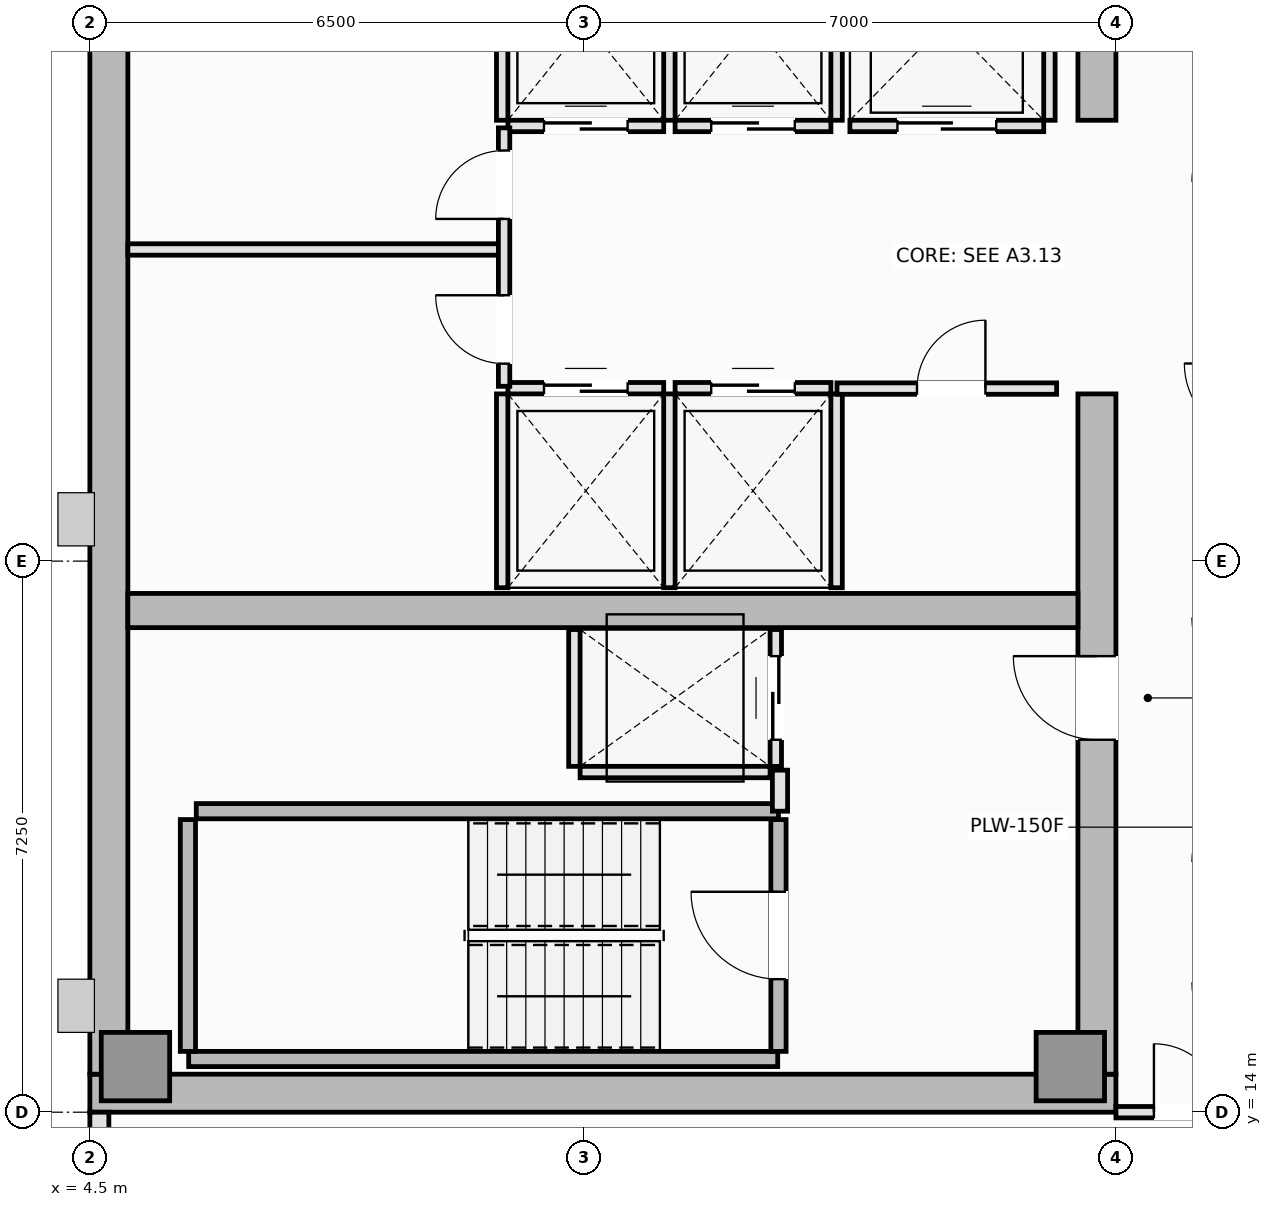
"""IFC4 building model, lengths in metres.
Left out: names, types, materials, properties, quantities, classifications, styles, units other than length and angle.
Written with IfcOpenShell. Run it as: python <this file> out.ifc"""

import sys

from ifc_helpers import new_model, si_unit, direction, frame, frame_2d, origin, origin_2d, place, context, subcontext, project, spatial, rectangle, extrude, element, fill, save


model = new_model("IFC4")
c1 = context("Model", 3, precision=1e-05, world=origin(), true_north=direction((0.0, 1.0)))
c2 = subcontext(c1, "Body", "Model", "MODEL_VIEW")
j1 = project(units=[si_unit("LENGTHUNIT", "METRE"), si_unit("PLANEANGLEUNIT", "RADIAN")], contexts=[c1])
p1 = place(None, origin())
s1 = spatial("IfcSite", under=j1, at=p1, CompositionType="ELEMENT")
p2 = place(p1, origin())
s2 = spatial("IfcBuilding", under=s1, at=p2, CompositionType="ELEMENT")
p3 = place(p2, frame((0.0, 0.0, 284.75)))
s3 = spatial("IfcBuildingStorey", under=s2, at=p3, CompositionType="ELEMENT", Elevation=284.75)
p4 = place(p3, frame((4.5, 14.25, 0.0), z_axis=(0.0, 0.0, 1.0), x_axis=(1.0, 0.0, 0.0)))
e1 = element("IfcWall", 1, at=p4, inside=s3, PredefinedType="SHEAR", context=c2, shape_type="SweptSolid", body=[
    extrude(rectangle(XDim=13.5, YDim=0.5, at=frame_2d((6.75, 0.0))), origin(), (0.0, 0.0, 1.0), 3.55),
])
p5 = place(p3, frame((4.75, 14.5, 0.0), z_axis=(0.0, 0.0, 1.0), x_axis=(0.0, 1.0, 0.0)))
e2 = element("IfcWall", 2, at=p5, inside=s3, PredefinedType="SHEAR", context=c2, shape_type="SweptSolid", body=[
    extrude(rectangle(XDim=21.5, YDim=0.5, at=frame_2d((10.75, 0.0))), origin(), (0.0, 0.0, 1.0), 3.55),
])
p6 = place(p3, frame((17.75, 14.5, 0.0), z_axis=(0.0, 0.0, 1.0), x_axis=(0.0, 1.0, 0.0)))
e3 = element("IfcWall", 3, at=p6, inside=s3, PredefinedType="SHEAR", context=c2, shape_type="SweptSolid", body=[
    extrude(rectangle(XDim=8.95, YDim=0.5, at=frame_2d((4.475, 0.0))), origin(), (0.0, 0.0, 1.0), 3.55),
])
p7 = place(p6, frame((4.4, 0.0, 0.0)))
e4 = element("IfcOpeningElement", 4, at=p7, cuts=e3, PredefinedType="OPENING", context=c2, shape_type="SweptSolid", body=[
    extrude(rectangle(XDim=1.1, YDim=2.15, at=frame_2d((0.55, 1.075))), frame((0.0, 0.26, 0.0), z_axis=(0.0, -1.0, 0.0), x_axis=(1.0, 0.0, 0.0)), (0.0, 0.0, 1.0), 0.52),
])
p8 = place(p3, frame((17.75, 27.05, 0.0), z_axis=(0.0, 0.0, 1.0), x_axis=(0.0, 1.0, 0.0)))
e5 = element("IfcWall", 5, at=p8, inside=s3, PredefinedType="SHEAR", context=c2, shape_type="SweptSolid", body=[
    extrude(rectangle(XDim=8.95, YDim=0.5, at=frame_2d((4.475, 0.0))), origin(), (0.0, 0.0, 1.0), 3.55),
])
p9 = place(p8, frame((3.45, 0.0, 0.0)))
e6 = element("IfcOpeningElement", 6, at=p9, cuts=e5, PredefinedType="OPENING", context=c2, shape_type="SweptSolid", body=[
    extrude(rectangle(XDim=1.1, YDim=2.15, at=frame_2d((0.55, 1.075))), frame((0.0, 0.26, 0.0), z_axis=(0.0, -1.0, 0.0), x_axis=(1.0, 0.0, 0.0)), (0.0, 0.0, 1.0), 0.52),
])
p10 = place(p3, frame((5.0, 20.6, 0.0), z_axis=(0.0, 0.0, 1.0), x_axis=(1.0, 0.0, 0.0)))
e7 = element("IfcWall", 7, at=p10, inside=s3, PredefinedType="SHEAR", context=c2, shape_type="SweptSolid", body=[
    extrude(rectangle(XDim=12.5, YDim=0.45, at=frame_2d((6.25, 0.0))), origin(), (0.0, 0.0, 1.0), 3.55),
])
for number, where, z_axis, x_axis in (
    (8, (5.1, 14.6, 0.0), (0.0, 0.0, 1.0), (1.0, 0.0, 0.0)),
    (9, (17.4, 14.6, 0.0), (0.0, 0.0, 1.0), (1.0, 0.0, 0.0)),
):
    element("IfcColumn", number, at=place(p3, frame(where, z_axis=z_axis, x_axis=x_axis)), inside=s3, PredefinedType="PILASTER", context=c2, shape_type="SweptSolid", body=[
        extrude(rectangle(XDim=0.9, YDim=0.9, at=origin_2d()), origin(), (0.0, 0.0, 1.0), 3.55),
    ])
p11 = place(p3, frame((4.625, 14.0, 0.0), z_axis=(0.0, 0.0, 1.0), x_axis=(0.0, -1.0, 0.0)))
e10 = element("IfcWall", 10, at=p11, inside=s3, PredefinedType="SOLIDWALL", context=c2, shape_type="SweptSolid", body=[
    extrude(rectangle(XDim=3.4, YDim=0.25, at=frame_2d((1.7, 0.0))), origin(), (0.0, 0.0, 1.0), 3.39),
])
p12 = place(p11, frame((0.6, 0.0, 0.9)))
e11 = element("IfcOpeningElement", 11, at=p12, cuts=e10, PredefinedType="OPENING", context=c2, shape_type="SweptSolid", body=[
    extrude(rectangle(XDim=2.2, YDim=1.8, at=frame_2d((1.1, 0.9))), frame((0.0, 0.135, 0.0), z_axis=(0.0, -1.0, 0.0), x_axis=(1.0, 0.0, 0.0)), (0.0, 0.0, 1.0), 0.27),
])
p13 = place(p3, frame((5.8, 14.7, 0.0), z_axis=(0.0, 0.0, 1.0), x_axis=(1.0, 0.0, 0.0)))
e12 = element("IfcWall", 12, at=p13, inside=s3, PredefinedType="SOLIDWALL", context=c2, shape_type="SweptSolid", body=[
    extrude(rectangle(XDim=7.75, YDim=0.2, at=frame_2d((3.875, 0.0))), origin(), (0.0, 0.0, 1.0), 3.55),
])
p14 = place(p3, frame((5.79, 14.8, 0.0), z_axis=(0.0, 0.0, 1.0), x_axis=(0.0, 1.0, 0.0)))
e13 = element("IfcWall", 13, at=p14, inside=s3, PredefinedType="SOLIDWALL", context=c2, shape_type="SweptSolid", body=[
    extrude(rectangle(XDim=3.05, YDim=0.2, at=frame_2d((1.525, 0.0))), origin(), (0.0, 0.0, 1.0), 3.55),
])
p15 = place(p3, frame((5.9, 17.96, 0.0), z_axis=(0.0, 0.0, 1.0), x_axis=(1.0, 0.0, 0.0)))
e14 = element("IfcWall", 14, at=p15, inside=s3, PredefinedType="SOLIDWALL", context=c2, shape_type="SweptSolid", body=[
    extrude(rectangle(XDim=7.66, YDim=0.2, at=frame_2d((3.83, 0.0))), origin(), (0.0, 0.0, 1.0), 3.55),
])
p16 = place(p3, frame((13.56, 14.8, 0.0), z_axis=(0.0, 0.0, 1.0), x_axis=(0.0, 1.0, 0.0)))
e15 = element("IfcWall", 15, at=p16, inside=s3, PredefinedType="SOLIDWALL", context=c2, shape_type="SweptSolid", body=[
    extrude(rectangle(XDim=3.05, YDim=0.2, at=frame_2d((1.525, 0.0))), origin(), (0.0, 0.0, 1.0), 3.55),
])
p17 = place(p16, frame((0.95, 0.0, 0.0)))
e16 = element("IfcOpeningElement", 16, at=p17, cuts=e15, PredefinedType="OPENING", context=c2, shape_type="SweptSolid", body=[
    extrude(rectangle(XDim=1.15, YDim=2.15, at=frame_2d((0.575, 1.075))), frame((0.0, 0.11, 0.0), z_axis=(0.0, -1.0, 0.0), x_axis=(1.0, 0.0, 0.0)), (0.0, 0.0, 1.0), 0.22),
])
p18 = place(p3, frame((10.0, 23.525, 0.0), z_axis=(0.0, 0.0, 1.0), x_axis=(1.0, 0.0, 0.0)))
e17 = element("IfcWall", 17, at=p18, inside=s3, PredefinedType="PARTITIONING", context=c2, shape_type="SweptSolid", body=[
    extrude(rectangle(XDim=2.05, YDim=0.15, at=frame_2d((1.025, 0.0))), origin(), (0.0, 0.0, 1.0), 3.39),
])
p19 = place(p18, frame((0.475, 0.0, 0.0)))
e18 = element("IfcOpeningElement", 18, at=p19, cuts=e17, PredefinedType="OPENING", context=c2, shape_type="SweptSolid", body=[
    extrude(rectangle(XDim=1.1, YDim=2.2, at=frame_2d((0.55, 1.1))), frame((0.0, 0.085, 0.0), z_axis=(0.0, -1.0, 0.0), x_axis=(1.0, 0.0, 0.0)), (0.0, 0.0, 1.0), 0.17),
])
for number, where, z_axis, x_axis in (
    (19, (9.925, 20.9, 0.0), (0.0, 0.0, 1.0), (0.0, 1.0, 0.0)),
    (20, (12.125, 20.9, 0.0), (0.0, 0.0, 1.0), (0.0, 1.0, 0.0)),
):
    element("IfcWall", number, at=place(p3, frame(where, z_axis=z_axis, x_axis=x_axis)), inside=s3, PredefinedType="PARTITIONING", context=c2, shape_type="SweptSolid", body=[
        extrude(rectangle(XDim=2.55, YDim=0.15, at=frame_2d((1.275, 0.0))), origin(), (0.0, 0.0, 1.0), 3.39),
    ])
p20 = place(p3, frame((12.2, 23.525, 0.0), z_axis=(0.0, 0.0, 1.0), x_axis=(1.0, 0.0, 0.0)))
e21 = element("IfcWall", 21, at=p20, inside=s3, PredefinedType="PARTITIONING", context=c2, shape_type="SweptSolid", body=[
    extrude(rectangle(XDim=2.05, YDim=0.15, at=frame_2d((1.025, 0.0))), origin(), (0.0, 0.0, 1.0), 3.39),
])
p21 = place(p20, frame((0.475, 0.0, 0.0)))
e22 = element("IfcOpeningElement", 22, at=p21, cuts=e21, PredefinedType="OPENING", context=c2, shape_type="SweptSolid", body=[
    extrude(rectangle(XDim=1.1, YDim=2.2, at=frame_2d((0.55, 1.1))), frame((0.0, 0.085, 0.0), z_axis=(0.0, -1.0, 0.0), x_axis=(1.0, 0.0, 0.0)), (0.0, 0.0, 1.0), 0.17),
])
p22 = place(p3, frame((14.325, 20.9, 0.0), z_axis=(0.0, 0.0, 1.0), x_axis=(0.0, 1.0, 0.0)))
e23 = element("IfcWall", 23, at=p22, inside=s3, PredefinedType="PARTITIONING", context=c2, shape_type="SweptSolid", body=[
    extrude(rectangle(XDim=2.55, YDim=0.15, at=frame_2d((1.275, 0.0))), origin(), (0.0, 0.0, 1.0), 3.39),
])
p23 = place(p3, frame((10.0, 26.975, 0.0), z_axis=(0.0, 0.0, 1.0), x_axis=(1.0, 0.0, 0.0)))
e24 = element("IfcWall", 24, at=p23, inside=s3, PredefinedType="PARTITIONING", context=c2, shape_type="SweptSolid", body=[
    extrude(rectangle(XDim=2.05, YDim=0.15, at=frame_2d((1.025, 0.0))), origin(), (0.0, 0.0, 1.0), 3.39),
])
p24 = place(p23, frame((0.475, 0.0, 0.0)))
e25 = element("IfcOpeningElement", 25, at=p24, cuts=e24, PredefinedType="OPENING", context=c2, shape_type="SweptSolid", body=[
    extrude(rectangle(XDim=1.1, YDim=2.2, at=frame_2d((0.55, 1.1))), frame((0.0, 0.085, 0.0), z_axis=(0.0, -1.0, 0.0), x_axis=(1.0, 0.0, 0.0)), (0.0, 0.0, 1.0), 0.17),
])
for number, where, z_axis, x_axis in (
    (26, (9.925, 27.05, 0.0), (0.0, 0.0, 1.0), (0.0, 1.0, 0.0)),
    (27, (12.125, 27.05, 0.0), (0.0, 0.0, 1.0), (0.0, 1.0, 0.0)),
):
    element("IfcWall", number, at=place(p3, frame(where, z_axis=z_axis, x_axis=x_axis)), inside=s3, PredefinedType="PARTITIONING", context=c2, shape_type="SweptSolid", body=[
        extrude(rectangle(XDim=2.55, YDim=0.15, at=frame_2d((1.275, 0.0))), origin(), (0.0, 0.0, 1.0), 3.39),
    ])
p25 = place(p3, frame((12.2, 26.975, 0.0), z_axis=(0.0, 0.0, 1.0), x_axis=(1.0, 0.0, 0.0)))
e28 = element("IfcWall", 28, at=p25, inside=s3, PredefinedType="PARTITIONING", context=c2, shape_type="SweptSolid", body=[
    extrude(rectangle(XDim=2.05, YDim=0.15, at=frame_2d((1.025, 0.0))), origin(), (0.0, 0.0, 1.0), 3.39),
])
p26 = place(p25, frame((0.475, 0.0, 0.0)))
e29 = element("IfcOpeningElement", 29, at=p26, cuts=e28, PredefinedType="OPENING", context=c2, shape_type="SweptSolid", body=[
    extrude(rectangle(XDim=1.1, YDim=2.2, at=frame_2d((0.55, 1.1))), frame((0.0, 0.085, 0.0), z_axis=(0.0, -1.0, 0.0), x_axis=(1.0, 0.0, 0.0)), (0.0, 0.0, 1.0), 0.17),
])
p27 = place(p3, frame((14.325, 27.05, 0.0), z_axis=(0.0, 0.0, 1.0), x_axis=(0.0, 1.0, 0.0)))
e30 = element("IfcWall", 30, at=p27, inside=s3, PredefinedType="PARTITIONING", context=c2, shape_type="SweptSolid", body=[
    extrude(rectangle(XDim=2.55, YDim=0.15, at=frame_2d((1.275, 0.0))), origin(), (0.0, 0.0, 1.0), 3.39),
])
p28 = place(p3, frame((14.5, 26.975, 0.0), z_axis=(0.0, 0.0, 1.0), x_axis=(1.0, 0.0, 0.0)))
e31 = element("IfcWall", 31, at=p28, inside=s3, PredefinedType="PARTITIONING", context=c2, shape_type="SweptSolid", body=[
    extrude(rectangle(XDim=2.55, YDim=0.15, at=frame_2d((1.275, 0.0))), origin(), (0.0, 0.0, 1.0), 3.39),
])
p29 = place(p28, frame((0.625, 0.0, 0.0)))
e32 = element("IfcOpeningElement", 32, at=p29, cuts=e31, PredefinedType="OPENING", context=c2, shape_type="SweptSolid", body=[
    extrude(rectangle(XDim=1.3, YDim=2.2, at=frame_2d((0.65, 1.1))), frame((0.0, 0.085, 0.0), z_axis=(0.0, -1.0, 0.0), x_axis=(1.0, 0.0, 0.0)), (0.0, 0.0, 1.0), 0.17),
])
p30 = place(p3, frame((17.125, 27.05, 0.0), z_axis=(0.0, 0.0, 1.0), x_axis=(0.0, 1.0, 0.0)))
e33 = element("IfcWall", 33, at=p30, inside=s3, PredefinedType="PARTITIONING", context=c2, shape_type="SweptSolid", body=[
    extrude(rectangle(XDim=2.6, YDim=0.15, at=frame_2d((1.3, 0.0))), origin(), (0.0, 0.0, 1.0), 3.39),
])
p31 = place(p3, frame((10.95, 18.475, 0.0), z_axis=(0.0, 0.0, 1.0), x_axis=(1.0, 0.0, 0.0)))
e34 = element("IfcWall", 34, at=p31, inside=s3, PredefinedType="PARTITIONING", context=c2, shape_type="SweptSolid", body=[
    extrude(rectangle(XDim=2.5, YDim=0.15, at=frame_2d((1.25, 0.0))), origin(), (0.0, 0.0, 1.0), 3.39),
])
p32 = place(p3, frame((10.875, 18.55, 0.0), z_axis=(0.0, 0.0, 1.0), x_axis=(0.0, 1.0, 0.0)))
e35 = element("IfcWall", 35, at=p32, inside=s3, PredefinedType="PARTITIONING", context=c2, shape_type="SweptSolid", body=[
    extrude(rectangle(XDim=1.8, YDim=0.15, at=frame_2d((0.9, 0.0))), origin(), (0.0, 0.0, 1.0), 3.39),
])
p33 = place(p3, frame((13.525, 18.55, 0.0), z_axis=(0.0, 0.0, 1.0), x_axis=(0.0, 1.0, 0.0)))
e36 = element("IfcWall", 36, at=p33, inside=s3, PredefinedType="PARTITIONING", context=c2, shape_type="SweptSolid", body=[
    extrude(rectangle(XDim=1.8, YDim=0.15, at=frame_2d((0.9, 0.0))), origin(), (0.0, 0.0, 1.0), 3.39),
])
p34 = place(p33, frame((0.35, 0.0, 0.0)))
e37 = element("IfcOpeningElement", 37, at=p34, cuts=e36, PredefinedType="OPENING", context=c2, shape_type="SweptSolid", body=[
    extrude(rectangle(XDim=1.1, YDim=2.2, at=frame_2d((0.55, 1.1))), frame((0.0, 0.085, 0.0), z_axis=(0.0, -1.0, 0.0), x_axis=(1.0, 0.0, 0.0)), (0.0, 0.0, 1.0), 0.17),
])
p35 = place(p3, frame((13.58, 17.96, 0.0), z_axis=(0.0, 0.0, 1.0), x_axis=(0.0, 1.0, 0.0)))
e38 = element("IfcWall", 38, at=p35, inside=s3, PredefinedType="PARTITIONING", context=c2, shape_type="SweptSolid", body=[
    extrude(rectangle(XDim=0.54, YDim=0.2, at=frame_2d((0.27, 0.0))), origin(), (0.0, 0.0, 1.0), 3.39),
])
p36 = place(p3, frame((5.0, 25.35, 0.0), z_axis=(0.0, 0.0, 1.0), x_axis=(1.0, 0.0, 0.0)))
e39 = element("IfcWall", 39, at=p36, inside=s3, PredefinedType="PARTITIONING", context=c2, shape_type="SweptSolid", body=[
    extrude(rectangle(XDim=4.95, YDim=0.15, at=frame_2d((2.475, 0.0))), origin(), (0.0, 0.0, 1.0), 3.39),
])
p37 = place(p3, frame((9.95, 23.55, 0.0), z_axis=(0.0, 0.0, 1.0), x_axis=(0.0, 1.0, 0.0)))
e40 = element("IfcWall", 40, at=p37, inside=s3, PredefinedType="PARTITIONING", context=c2, shape_type="SweptSolid", body=[
    extrude(rectangle(XDim=3.4, YDim=0.15, at=frame_2d((1.7, 0.0))), origin(), (0.0, 0.0, 1.0), 3.39),
])
p38 = place(p37, frame((0.298, 0.0, 0.0)))
e41 = element("IfcOpeningElement", 41, at=p38, cuts=e40, PredefinedType="OPENING", context=c2, shape_type="SweptSolid", body=[
    extrude(rectangle(XDim=0.9, YDim=2.1, at=frame_2d((0.45, 1.05))), frame((0.0, 0.085, 0.0), z_axis=(0.0, -1.0, 0.0), x_axis=(1.0, 0.0, 0.0)), (0.0, 0.0, 1.0), 0.17),
])
p39 = place(p37, frame((2.202, 0.0, 0.0)))
e42 = element("IfcOpeningElement", 42, at=p39, cuts=e40, PredefinedType="OPENING", context=c2, shape_type="SweptSolid", body=[
    extrude(rectangle(XDim=0.9, YDim=2.1, at=frame_2d((0.45, 1.05))), frame((0.0, 0.085, 0.0), z_axis=(0.0, -1.0, 0.0), x_axis=(1.0, 0.0, 0.0)), (0.0, 0.0, 1.0), 0.17),
])
p40 = place(p3, frame((14.33, 23.52, 0.0), z_axis=(0.0, 0.0, 1.0), x_axis=(1.0, 0.0, 0.0)))
e43 = element("IfcWall", 43, at=p40, inside=s3, PredefinedType="PARTITIONING", context=c2, shape_type="SweptSolid", body=[
    extrude(rectangle(XDim=2.89, YDim=0.15, at=frame_2d((1.445, 0.0))), origin(), (0.0, 0.0, 1.0), 3.39),
])
p41 = place(p40, frame((1.053, 0.0, 0.0)))
e44 = element("IfcOpeningElement", 44, at=p41, cuts=e43, PredefinedType="OPENING", context=c2, shape_type="SweptSolid", body=[
    extrude(rectangle(XDim=0.9, YDim=2.1, at=frame_2d((0.45, 1.05))), frame((0.0, 0.085, 0.0), z_axis=(0.0, -1.0, 0.0), x_axis=(1.0, 0.0, 0.0)), (0.0, 0.0, 1.0), 0.17),
])
p42 = place(p3, frame((18.0, 14.0, 0.0), z_axis=(0.0, 0.0, 1.0), x_axis=(1.0, 0.0, 0.0)))
e45 = element("IfcWall", 45, at=p42, inside=s3, PredefinedType="PARTITIONING", context=c2, shape_type="SweptSolid", body=[
    extrude(rectangle(XDim=1.9, YDim=0.15, at=frame_2d((0.95, 0.0))), origin(), (0.0, 0.0, 1.0), 3.39),
])
p43 = place(p42, frame((0.5, 0.0, 0.0)))
e46 = element("IfcOpeningElement", 46, at=p43, cuts=e45, PredefinedType="OPENING", context=c2, shape_type="SweptSolid", body=[
    extrude(rectangle(XDim=0.9, YDim=2.1, at=frame_2d((0.45, 1.05))), frame((0.0, 0.085, 0.0), z_axis=(0.0, -1.0, 0.0), x_axis=(1.0, 0.0, 0.0)), (0.0, 0.0, 1.0), 0.17),
])
p44 = place(p17, origin())
e47 = element("IfcDoor", 47, at=p44, inside=s3, OperationType="SINGLE_SWING_RIGHT", PredefinedType="DOOR", context=c2, shape_type="SweptSolid", body=[
    extrude(rectangle(XDim=1.15, YDim=2.15, at=frame_2d((0.575, 1.075))), frame((0.0, 0.025, 0.0), z_axis=(0.0, -1.0, 0.0), x_axis=(1.0, 0.0, 0.0)), (0.0, 0.0, 1.0), 0.05),
])
fill(e16, e47)
p45 = place(p19, origin())
e48 = element("IfcDoor", 48, at=p45, inside=s3, OperationType="DOUBLE_DOOR_SLIDING", PredefinedType="DOOR", context=c2, shape_type="SweptSolid", body=[
    extrude(rectangle(XDim=1.1, YDim=2.2, at=frame_2d((0.55, 1.1))), frame((0.0, 0.025, 0.0), z_axis=(0.0, -1.0, 0.0), x_axis=(1.0, 0.0, 0.0)), (0.0, 0.0, 1.0), 0.05),
])
fill(e18, e48)
p46 = place(p21, origin())
e49 = element("IfcDoor", 49, at=p46, inside=s3, OperationType="DOUBLE_DOOR_SLIDING", PredefinedType="DOOR", context=c2, shape_type="SweptSolid", body=[
    extrude(rectangle(XDim=1.1, YDim=2.2, at=frame_2d((0.55, 1.1))), frame((0.0, 0.025, 0.0), z_axis=(0.0, -1.0, 0.0), x_axis=(1.0, 0.0, 0.0)), (0.0, 0.0, 1.0), 0.05),
])
fill(e22, e49)
p47 = place(p24, origin())
e50 = element("IfcDoor", 50, at=p47, inside=s3, OperationType="DOUBLE_DOOR_SLIDING", PredefinedType="DOOR", context=c2, shape_type="SweptSolid", body=[
    extrude(rectangle(XDim=1.1, YDim=2.2, at=frame_2d((0.55, 1.1))), frame((0.0, 0.025, 0.0), z_axis=(0.0, -1.0, 0.0), x_axis=(1.0, 0.0, 0.0)), (0.0, 0.0, 1.0), 0.05),
])
fill(e25, e50)
p48 = place(p26, origin())
e51 = element("IfcDoor", 51, at=p48, inside=s3, OperationType="DOUBLE_DOOR_SLIDING", PredefinedType="DOOR", context=c2, shape_type="SweptSolid", body=[
    extrude(rectangle(XDim=1.1, YDim=2.2, at=frame_2d((0.55, 1.1))), frame((0.0, 0.025, 0.0), z_axis=(0.0, -1.0, 0.0), x_axis=(1.0, 0.0, 0.0)), (0.0, 0.0, 1.0), 0.05),
])
fill(e29, e51)
p49 = place(p29, origin())
e52 = element("IfcDoor", 52, at=p49, inside=s3, OperationType="DOUBLE_DOOR_SLIDING", PredefinedType="DOOR", context=c2, shape_type="SweptSolid", body=[
    extrude(rectangle(XDim=1.3, YDim=2.2, at=frame_2d((0.65, 1.1))), frame((0.0, 0.025, 0.0), z_axis=(0.0, -1.0, 0.0), x_axis=(1.0, 0.0, 0.0)), (0.0, 0.0, 1.0), 0.05),
])
fill(e32, e52)
p50 = place(p34, origin())
e53 = element("IfcDoor", 53, at=p50, inside=s3, OperationType="DOUBLE_DOOR_SLIDING", PredefinedType="DOOR", context=c2, shape_type="SweptSolid", body=[
    extrude(rectangle(XDim=1.1, YDim=2.2, at=frame_2d((0.55, 1.1))), frame((0.0, 0.025, 0.0), z_axis=(0.0, -1.0, 0.0), x_axis=(1.0, 0.0, 0.0)), (0.0, 0.0, 1.0), 0.05),
])
fill(e37, e53)
p51 = place(p7, origin())
e54 = element("IfcDoor", 54, at=p51, inside=s3, OperationType="SINGLE_SWING_RIGHT", PredefinedType="DOOR", context=c2, shape_type="SweptSolid", body=[
    extrude(rectangle(XDim=1.1, YDim=2.15, at=frame_2d((0.55, 1.075))), frame((0.0, 0.025, 0.0), z_axis=(0.0, -1.0, 0.0), x_axis=(1.0, 0.0, 0.0)), (0.0, 0.0, 1.0), 0.05),
])
fill(e4, e54)
p52 = place(p38, origin())
e55 = element("IfcDoor", 55, at=p52, inside=s3, OperationType="SINGLE_SWING_RIGHT", PredefinedType="DOOR", context=c2, shape_type="SweptSolid", body=[
    extrude(rectangle(XDim=0.9, YDim=2.1, at=frame_2d((0.45, 1.05))), frame((0.0, 0.025, 0.0), z_axis=(0.0, -1.0, 0.0), x_axis=(1.0, 0.0, 0.0)), (0.0, 0.0, 1.0), 0.05),
])
fill(e41, e55)
p53 = place(p39, origin())
e56 = element("IfcDoor", 56, at=p53, inside=s3, OperationType="SINGLE_SWING_LEFT", PredefinedType="DOOR", context=c2, shape_type="SweptSolid", body=[
    extrude(rectangle(XDim=0.9, YDim=2.1, at=frame_2d((0.45, 1.05))), frame((0.0, 0.025, 0.0), z_axis=(0.0, -1.0, 0.0), x_axis=(1.0, 0.0, 0.0)), (0.0, 0.0, 1.0), 0.05),
])
fill(e42, e56)
p54 = place(p41, origin())
e57 = element("IfcDoor", 57, at=p54, inside=s3, OperationType="SINGLE_SWING_RIGHT", PredefinedType="DOOR", context=c2, shape_type="SweptSolid", body=[
    extrude(rectangle(XDim=0.9, YDim=2.1, at=frame_2d((0.45, 1.05))), frame((0.0, 0.025, 0.0), z_axis=(0.0, -1.0, 0.0), x_axis=(1.0, 0.0, 0.0)), (0.0, 0.0, 1.0), 0.05),
])
fill(e44, e57)
p55 = place(p43, origin())
e58 = element("IfcDoor", 58, at=p55, inside=s3, OperationType="SINGLE_SWING_LEFT", PredefinedType="DOOR", context=c2, shape_type="SweptSolid", body=[
    extrude(rectangle(XDim=0.9, YDim=2.1, at=frame_2d((0.45, 1.05))), frame((0.0, 0.025, 0.0), z_axis=(0.0, -1.0, 0.0), x_axis=(1.0, 0.0, 0.0)), (0.0, 0.0, 1.0), 0.05),
])
fill(e46, e58)
save(model, sys.argv[1])
